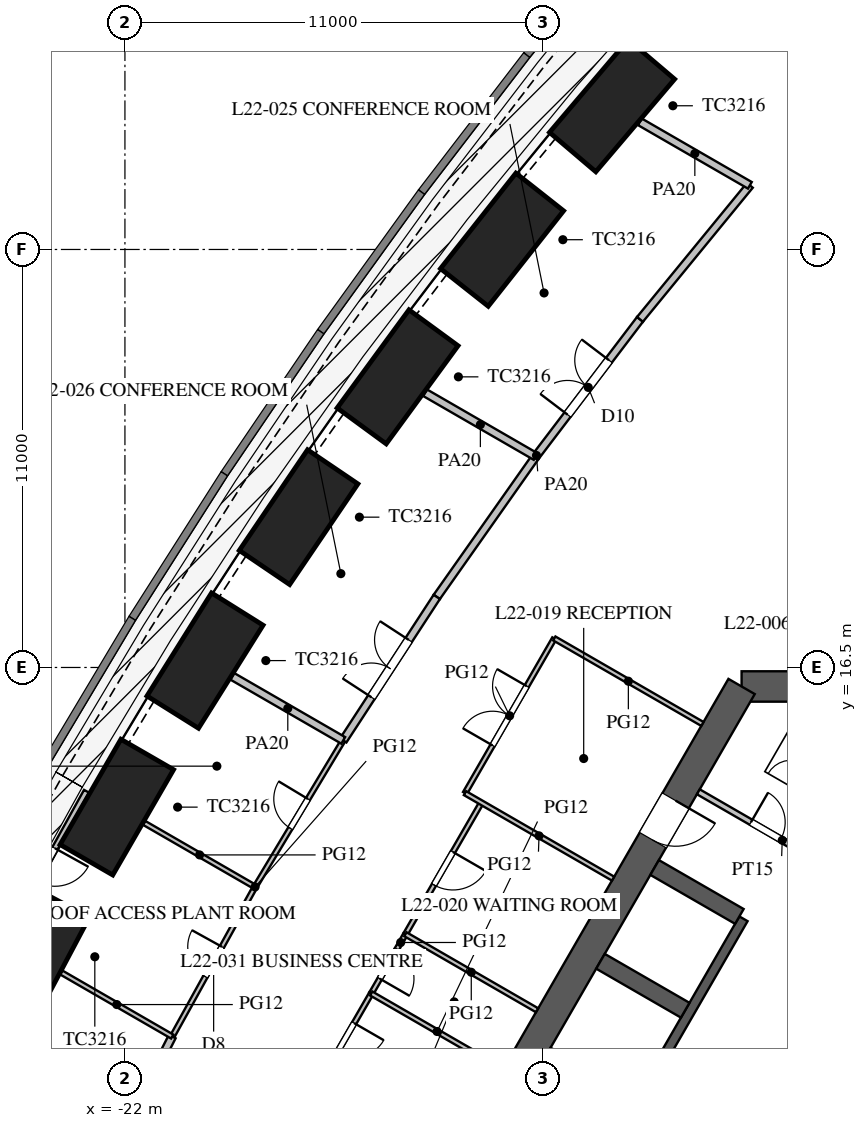
"""IFC4 building model, lengths in metres.
Left out: names, types, materials, properties, quantities, classifications, styles, units other than length and angle.
Written with IfcOpenShell. Run it as: python <this file> out.ifc"""

import sys

from ifc_helpers import new_model, si_unit, direction, frame, frame_2d, origin, origin_2d, place, context, subcontext, project, spatial, rectangle, extrude, element, fill, save


model = new_model("IFC4")
c1 = context("Model", 3, precision=1e-05, world=origin(), true_north=direction((0.0, 1.0)))
c2 = subcontext(c1, "Body", "Model", "MODEL_VIEW")
j1 = project(units=[si_unit("LENGTHUNIT", "METRE"), si_unit("PLANEANGLEUNIT", "RADIAN")], contexts=[c1])
p1 = place(None, origin())
s1 = spatial("IfcSite", under=j1, at=p1, CompositionType="ELEMENT")
p2 = place(p1, origin())
s2 = spatial("IfcBuilding", under=s1, at=p2, CompositionType="ELEMENT")
p3 = place(p2, frame((0.0, 0.0, 98.1)))
s3 = spatial("IfcBuildingStorey", under=s2, at=p3, CompositionType="ELEMENT", Elevation=98.1)
for number, where, z_axis, x_axis in (
    (1, (-9.182, 31.282, 0.0), (0.0, 0.0, 1.0), (-0.648, -0.762, 0.0)),
    (2, (-12.077, 27.757, 0.0), (0.0, 0.0, 1.0), (-0.62, -0.785, 0.0)),
    (3, (-14.825, 24.148, 0.0), (0.0, 0.0, 1.0), (-0.591, -0.807, 0.0)),
    (4, (-17.43, 20.456, 0.0), (0.0, 0.0, 1.0), (-0.561, -0.828, 0.0)),
    (5, (-19.893, 16.681, 0.0), (0.0, 0.0, 1.0), (-0.531, -0.847, 0.0)),
    (6, (-22.213, 12.825, 0.0), (0.0, 0.0, 1.0), (-0.5, -0.866, 0.0)),
    (7, (-24.393, 8.887, 0.0), (0.0, 0.0, 1.0), (-0.468, -0.883, 0.0)),
):
    element("IfcColumn", number, at=place(p3, frame(where, z_axis=z_axis, x_axis=x_axis)), inside=s3, PredefinedType="COLUMN", context=c2, shape_type="SweptSolid", body=[
        extrude(rectangle(XDim=3.2, YDim=1.6, at=origin_2d()), origin(), (0.0, 0.0, 1.0), 5.0),
    ])
p4 = place(p3, frame((5.773, 16.0, 0.0), z_axis=(0.0, 0.0, 1.0), x_axis=(-1.0, 0.0, 0.0)))
e8 = element("IfcWall", 8, at=p4, inside=s3, PredefinedType="SHEAR", context=c2, shape_type="SweptSolid", body=[
    extrude(rectangle(XDim=11.547, YDim=0.8, at=frame_2d((5.773, 0.0))), origin(), (0.0, 0.0, 1.0), 5.0),
])
p5 = place(p3, frame((-5.773, 16.0, 0.0), z_axis=(0.0, 0.0, 1.0), x_axis=(-0.500002442456, -0.866023993627, 0.0)))
e9 = element("IfcWall", 9, at=p5, inside=s3, PredefinedType="SHEAR", context=c2, shape_type="SweptSolid", body=[
    extrude(rectangle(XDim=21.939, YDim=0.8, at=frame_2d((10.97, 0.0))), origin(), (0.0, 0.0, 1.0), 5.0),
])
p6 = place(p5, frame((17.27, 0.0, 0.0)))
e10 = element("IfcOpeningElement", 10, at=p6, cuts=e9, PredefinedType="OPENING", context=c2, shape_type="SweptSolid", body=[
    extrude(rectangle(XDim=1.2, YDim=2.1, at=frame_2d((0.6, 1.05))), frame((0.0, 0.41, 0.0), z_axis=(0.0, -1.0, 0.0), x_axis=(1.0, 0.0, 0.0)), (0.0, 0.0, 1.0), 0.82),
])
p7 = place(p5, frame((3.47, 0.0, 0.0)))
e11 = element("IfcOpeningElement", 11, at=p7, cuts=e9, PredefinedType="OPENING", context=c2, shape_type="SweptSolid", body=[
    extrude(rectangle(XDim=1.2, YDim=2.1, at=frame_2d((0.6, 1.05))), frame((0.0, 0.41, 0.0), z_axis=(0.0, -1.0, 0.0), x_axis=(1.0, 0.0, 0.0)), (0.0, 0.0, 1.0), 0.82),
])
p8 = place(p3, frame((-5.724, 9.886, 0.0), z_axis=(0.0, 0.0, 1.0), x_axis=(-0.500001763848, -0.866024385424, 0.0)))
e12 = element("IfcWall", 12, at=p8, inside=s3, PredefinedType="SHEAR", context=c2, shape_type="SweptSolid", body=[
    extrude(rectangle(XDim=11.4, YDim=0.25, at=frame_2d((5.7, 0.0))), origin(), (0.0, 0.0, 1.0), 5.0),
])
p9 = place(p8, frame((6.525, 0.0, 0.0)))
e13 = element("IfcOpeningElement", 13, at=p9, cuts=e12, PredefinedType="OPENING", context=c2, shape_type="SweptSolid", body=[
    extrude(rectangle(XDim=1.2, YDim=2.2, at=frame_2d((0.6, 1.1))), frame((0.0, 0.135, 0.0), z_axis=(0.0, -1.0, 0.0), x_axis=(1.0, 0.0, 0.0)), (0.0, 0.0, 1.0), 0.27),
])
p10 = place(p8, frame((9.375, 0.0, 0.0)))
e14 = element("IfcOpeningElement", 14, at=p10, cuts=e12, PredefinedType="OPENING", context=c2, shape_type="SweptSolid", body=[
    extrude(rectangle(XDim=1.2, YDim=2.2, at=frame_2d((0.6, 1.1))), frame((0.0, 0.135, 0.0), z_axis=(0.0, -1.0, 0.0), x_axis=(1.0, 0.0, 0.0)), (0.0, 0.0, 1.0), 0.27),
])
p11 = place(p3, frame((-5.832, 9.949, 0.0), z_axis=(0.0, 0.0, 1.0), x_axis=(-0.866029291668, 0.499993265928, 0.0)))
e15 = element("IfcWall", 15, at=p11, inside=s3, PredefinedType="SHEAR", context=c2, shape_type="SweptSolid", body=[
    extrude(rectangle(XDim=2.575, YDim=0.45, at=frame_2d((1.288, 0.0))), origin(), (0.0, 0.0, 1.0), 5.0),
])
for number, where, z_axis, x_axis in (
    (16, (-7.257, 7.481, 0.0), (0.0, 0.0, 1.0), (-0.866, 0.5, 0.0)),
    (17, (-8.682, 5.012, 0.0), (0.0, 0.0, 1.0), (-0.866, 0.5, 0.0)),
):
    element("IfcWall", number, at=place(p3, frame(where, z_axis=z_axis, x_axis=x_axis)), inside=s3, PredefinedType="SHEAR", context=c2, shape_type="SweptSolid", body=[
        extrude(rectangle(XDim=2.575, YDim=0.45, at=frame_2d((1.288, 0.0))), origin(), (0.0, 0.0, 1.0), 5.0),
    ])
p12 = place(p3, frame((-8.372, 36.01, 0.0), z_axis=(0.0, 0.0, 1.0), x_axis=(-0.631833879056, -0.775103831288, 0.0)))
e18 = element("IfcWall", 18, at=p12, inside=s3, PredefinedType="PARAPET", context=c2, shape_type="SweptSolid", body=[
    extrude(rectangle(XDim=4.558, YDim=0.25, at=frame_2d((2.279, 0.0))), origin(), (0.0, 0.0, 1.0), 1.1),
])
p13 = place(p3, frame((-11.252, 32.477, 0.0), z_axis=(0.0, 0.0, 1.0), x_axis=(-0.608784932975, -0.79333530451, 0.0)))
e19 = element("IfcWall", 19, at=p13, inside=s3, PredefinedType="PARAPET", context=c2, shape_type="SweptSolid", body=[
    extrude(rectangle(XDim=4.539, YDim=0.25, at=frame_2d((2.27, 0.0))), origin(), (0.0, 0.0, 1.0), 1.1),
])
p14 = place(p3, frame((-14.015, 28.876, 0.0), z_axis=(0.0, 0.0, 1.0), x_axis=(-0.585376255171, -0.810761765183, 0.0)))
e20 = element("IfcWall", 20, at=p14, inside=s3, PredefinedType="PARAPET", context=c2, shape_type="SweptSolid", body=[
    extrude(rectangle(XDim=4.523, YDim=0.25, at=frame_2d((2.262, 0.0))), origin(), (0.0, 0.0, 1.0), 1.1),
])
p15 = place(p3, frame((-16.663, 25.209, 0.0), z_axis=(0.0, 0.0, 1.0), x_axis=(-0.561512004239, -0.827468591002, 0.0)))
e21 = element("IfcWall", 21, at=p15, inside=s3, PredefinedType="PARAPET", context=c2, shape_type="SweptSolid", body=[
    extrude(rectangle(XDim=4.512, YDim=0.25, at=frame_2d((2.256, 0.0))), origin(), (0.0, 0.0, 1.0), 1.1),
])
p16 = place(p3, frame((-19.197, 21.475, 0.0), z_axis=(0.0, 0.0, 1.0), x_axis=(-0.537205132487, -0.843451626135, 0.0)))
e22 = element("IfcWall", 22, at=p16, inside=s3, PredefinedType="PARAPET", context=c2, shape_type="SweptSolid", body=[
    extrude(rectangle(XDim=4.504, YDim=0.25, at=frame_2d((2.252, 0.0))), origin(), (0.0, 0.0, 1.0), 1.1),
])
p17 = place(p3, frame((-21.616, 17.676, 0.0), z_axis=(0.0, 0.0, 1.0), x_axis=(-0.51252396108, -0.858672923364, 0.0)))
e23 = element("IfcWall", 23, at=p17, inside=s3, PredefinedType="PARAPET", context=c2, shape_type="SweptSolid", body=[
    extrude(rectangle(XDim=4.5, YDim=0.25, at=frame_2d((2.25, 0.0))), origin(), (0.0, 0.0, 1.0), 1.1),
])
p18 = place(p3, frame((-23.923, 13.812, 0.0), z_axis=(0.0, 0.0, 1.0), x_axis=(-0.487373854787, -0.873193406795, 0.0)))
e24 = element("IfcWall", 24, at=p18, inside=s3, PredefinedType="PARAPET", context=c2, shape_type="SweptSolid", body=[
    extrude(rectangle(XDim=4.5, YDim=0.25, at=frame_2d((2.25, 0.0))), origin(), (0.0, 0.0, 1.0), 1.1),
])
p19 = place(p3, frame((-23.01, 13.243, 0.0), z_axis=(0.0, 0.0, 1.0), x_axis=(-0.48433245205, -0.874884035682, 0.0)))
e25 = element("IfcWall", 25, at=p19, inside=s3, PredefinedType="SOLIDWALL", context=c2, shape_type="SweptSolid", body=[
    extrude(rectangle(XDim=4.431, YDim=0.15, at=frame_2d((2.215, 0.0))), origin(), (0.0, 0.0, 1.0), 4.98),
])
p20 = place(p19, frame((1.715, 0.0, 0.0)))
e26 = element("IfcOpeningElement", 26, at=p20, cuts=e25, PredefinedType="OPENING", context=c2, shape_type="SweptSolid", body=[
    extrude(rectangle(XDim=1.0, YDim=2.1, at=frame_2d((0.5, 1.05))), frame((0.0, 0.085, 0.0), z_axis=(0.0, -1.0, 0.0), x_axis=(1.0, 0.0, 0.0)), (0.0, 0.0, 1.0), 0.17),
])
p21 = place(p3, frame((-2.495, 10.678, 0.0), z_axis=(0.0, 0.0, 1.0), x_axis=(-0.86602216432, 0.500005610874, 0.0)))
e27 = element("IfcWall", 27, at=p21, inside=s3, PredefinedType="PARTITIONING", context=c2, shape_type="SweptSolid", body=[
    extrude(rectangle(XDim=5.1, YDim=0.15, at=frame_2d((2.55, 0.0))), origin(), (0.0, 0.0, 1.0), 4.8),
])
p22 = place(p21, frame((2.6, 0.0, 0.0)))
e28 = element("IfcOpeningElement", 28, at=p22, cuts=e27, PredefinedType="OPENING", context=c2, shape_type="SweptSolid", body=[
    extrude(rectangle(XDim=0.9, YDim=2.1, at=frame_2d((0.45, 1.05))), frame((0.0, 0.085, 0.0), z_axis=(0.0, -1.0, 0.0), x_axis=(1.0, 0.0, 0.0)), (0.0, 0.0, 1.0), 0.17),
])
p23 = place(p3, frame((-15.519, 7.921, 0.0), z_axis=(0.0, 0.0, 1.0), x_axis=(-0.50000943426, -0.866019956843, 0.0)))
e29 = element("IfcWall", 29, at=p23, inside=s3, PredefinedType="PARTITIONING", context=c2, shape_type="SweptSolid", body=[
    extrude(rectangle(XDim=2.7, YDim=0.12, at=frame_2d((1.35, 0.0))), origin(), (0.0, 0.0, 1.0), 3.6),
])
p24 = place(p23, frame((0.9, 0.0, 0.0)))
e30 = element("IfcOpeningElement", 30, at=p24, cuts=e29, PredefinedType="OPENING", context=c2, shape_type="SweptSolid", body=[
    extrude(rectangle(XDim=0.9, YDim=2.1, at=frame_2d((0.45, 1.05))), frame((0.0, 0.07, 0.0), z_axis=(0.0, -1.0, 0.0), x_axis=(1.0, 0.0, 0.0)), (0.0, 0.0, 1.0), 0.14),
])
p25 = place(p3, frame((-14.619, 9.479, 0.0), z_axis=(0.0, 0.0, 1.0), x_axis=(-0.499961193289, -0.866047807691, 0.0)))
e31 = element("IfcWall", 31, at=p25, inside=s3, PredefinedType="PARTITIONING", context=c2, shape_type="SweptSolid", body=[
    extrude(rectangle(XDim=1.8, YDim=0.12, at=frame_2d((0.9, 0.0))), origin(), (0.0, 0.0, 1.0), 3.6),
])
p26 = place(p25, frame((0.45, 0.0, 0.0)))
e32 = element("IfcOpeningElement", 32, at=p26, cuts=e31, PredefinedType="OPENING", context=c2, shape_type="SweptSolid", body=[
    extrude(rectangle(XDim=0.9, YDim=2.1, at=frame_2d((0.45, 1.05))), frame((0.0, 0.07, 0.0), z_axis=(0.0, -1.0, 0.0), x_axis=(1.0, 0.0, 0.0)), (0.0, 0.0, 1.0), 0.14),
])
p27 = place(p3, frame((-12.619, 12.944, 0.0), z_axis=(0.0, 0.0, 1.0), x_axis=(-0.49999894854, -0.866026010844, 0.0)))
e33 = element("IfcWall", 33, at=p27, inside=s3, PredefinedType="PARTITIONING", context=c2, shape_type="SweptSolid", body=[
    extrude(rectangle(XDim=4.0, YDim=0.12, at=frame_2d((2.0, 0.0))), origin(), (0.0, 0.0, 1.0), 3.6),
])
p28 = place(p27, frame((1.5, 0.0, 0.0)))
e34 = element("IfcOpeningElement", 34, at=p28, cuts=e33, PredefinedType="OPENING", context=c2, shape_type="SweptSolid", body=[
    extrude(rectangle(XDim=1.0, YDim=2.1, at=frame_2d((0.5, 1.05))), frame((0.0, 0.07, 0.0), z_axis=(0.0, -1.0, 0.0), x_axis=(1.0, 0.0, 0.0)), (0.0, 0.0, 1.0), 0.14),
])
p29 = place(p3, frame((-10.702, 17.264, 0.0), z_axis=(0.0, 0.0, 1.0), x_axis=(-0.499977259774, -0.866038532462, 0.0)))
e35 = element("IfcWall", 35, at=p29, inside=s3, PredefinedType="PARTITIONING", context=c2, shape_type="SweptSolid", body=[
    extrude(rectangle(XDim=4.7, YDim=0.12, at=frame_2d((2.35, 0.0))), origin(), (0.0, 0.0, 1.0), 3.6),
])
p30 = place(p29, frame((1.45, 0.0, 0.0)))
e36 = element("IfcOpeningElement", 36, at=p30, cuts=e35, PredefinedType="OPENING", context=c2, shape_type="SweptSolid", body=[
    extrude(rectangle(XDim=1.8, YDim=2.1, at=frame_2d((0.9, 1.05))), frame((0.0, 0.07, 0.0), z_axis=(0.0, -1.0, 0.0), x_axis=(1.0, 0.0, 0.0)), (0.0, 0.0, 1.0), 0.14),
])
for number, where, z_axis, x_axis in (
    (37, (-12.055, 5.921, 0.0), (0.0, 0.0, 1.0), (-0.866, 0.5, 0.0)),
    (38, (-11.155, 7.479, 0.0), (0.0, 0.0, 1.0), (-0.866, 0.5, 0.0)),
):
    element("IfcWall", number, at=place(p3, frame(where, z_axis=z_axis, x_axis=x_axis)), inside=s3, PredefinedType="PARTITIONING", context=c2, shape_type="SweptSolid", body=[
        extrude(rectangle(XDim=4.0, YDim=0.12, at=frame_2d((2.0, 0.0))), origin(), (0.0, 0.0, 1.0), 3.6),
    ])
p31 = place(p3, frame((-9.155, 10.944, 0.0), z_axis=(0.0, 0.0, 1.0), x_axis=(-0.866017533419, 0.500013631625, 0.0)))
e39 = element("IfcWall", 39, at=p31, inside=s3, PredefinedType="PARTITIONING", context=c2, shape_type="SweptSolid", body=[
    extrude(rectangle(XDim=4.5, YDim=0.12, at=frame_2d((2.25, 0.0))), origin(), (0.0, 0.0, 1.0), 3.6),
])
p32 = place(p3, frame((-6.805, 15.014, 0.0), z_axis=(0.0, 0.0, 1.0), x_axis=(-0.866031096941, 0.499990139034, 0.0)))
e40 = element("IfcWall", 40, at=p32, inside=s3, PredefinedType="PARTITIONING", context=c2, shape_type="SweptSolid", body=[
    extrude(rectangle(XDim=4.5, YDim=0.12, at=frame_2d((2.25, 0.0))), origin(), (0.0, 0.0, 1.0), 3.6),
])
p33 = place(p3, frame((-18.576, 10.725, 0.0), z_axis=(0.0, 0.0, 1.0), x_axis=(-0.484292898211, -0.874905931368, 0.0)))
e41 = element("IfcWall", 41, at=p33, inside=s3, PredefinedType="PARTITIONING", context=c2, shape_type="SweptSolid", body=[
    extrude(rectangle(XDim=4.501, YDim=0.12, at=frame_2d((2.25, 0.0))), origin(), (0.0, 0.0, 1.0), 3.6),
])
p34 = place(p33, frame((1.8, 0.0, 0.0)))
e42 = element("IfcOpeningElement", 42, at=p34, cuts=e41, PredefinedType="OPENING", context=c2, shape_type="SweptSolid", body=[
    extrude(rectangle(XDim=0.9, YDim=2.1, at=frame_2d((0.45, 1.05))), frame((0.0, 0.07, 0.0), z_axis=(0.0, -1.0, 0.0), x_axis=(1.0, 0.0, 0.0)), (0.0, 0.0, 1.0), 0.14),
])
p35 = place(p3, frame((-20.756, 6.787, 0.0), z_axis=(0.0, 0.0, 1.0), x_axis=(-0.452471679136, -0.891778772779, 0.0)))
e43 = element("IfcWall", 43, at=p35, inside=s3, PredefinedType="PARTITIONING", context=c2, shape_type="SweptSolid", body=[
    extrude(rectangle(XDim=4.507, YDim=0.2, at=frame_2d((2.253, 0.0))), origin(), (0.0, 0.0, 1.0), 3.6),
])
p36 = place(p3, frame((-11.192, 22.05, 0.0), z_axis=(0.0, 0.0, 1.0), x_axis=(-0.575987178736, -0.817458726745, 0.0)))
e44 = element("IfcWall", 44, at=p36, inside=s3, PredefinedType="PARTITIONING", context=c2, shape_type="SweptSolid", body=[
    extrude(rectangle(XDim=4.518, YDim=0.2, at=frame_2d((2.259, 0.0))), origin(), (0.0, 0.0, 1.0), 3.6),
])
p37 = place(p3, frame((-8.447, 25.661, 0.0), z_axis=(0.0, 0.0, 1.0), x_axis=(-0.605274299339, -0.796016973789, 0.0)))
e45 = element("IfcWall", 45, at=p37, inside=s3, PredefinedType="PARTITIONING", context=c2, shape_type="SweptSolid", body=[
    extrude(rectangle(XDim=4.536, YDim=0.2, at=frame_2d((2.268, 0.0))), origin(), (0.0, 0.0, 1.0), 3.6),
])
p38 = place(p37, frame((1.35, 0.0, 0.0)))
e46 = element("IfcOpeningElement", 46, at=p38, cuts=e45, PredefinedType="OPENING", context=c2, shape_type="SweptSolid", body=[
    extrude(rectangle(XDim=1.8, YDim=2.1, at=frame_2d((0.9, 1.05))), frame((0.0, 0.11, 0.0), z_axis=(0.0, -1.0, 0.0), x_axis=(1.0, 0.0, 0.0)), (0.0, 0.0, 1.0), 0.22),
])
p39 = place(p3, frame((-5.556, 29.188, 0.0), z_axis=(0.0, 0.0, 1.0), x_axis=(-0.633843962561, -0.773460943503, 0.0)))
e47 = element("IfcWall", 47, at=p39, inside=s3, PredefinedType="PARTITIONING", context=c2, shape_type="SweptSolid", body=[
    extrude(rectangle(XDim=4.561, YDim=0.2, at=frame_2d((2.28, 0.0))), origin(), (0.0, 0.0, 1.0), 3.6),
])
p40 = place(p3, frame((-16.256, 14.581, 0.0), z_axis=(0.0, 0.0, 1.0), x_axis=(-0.515548366618, -0.856860479703, 0.0)))
e48 = element("IfcWall", 48, at=p40, inside=s3, PredefinedType="PARTITIONING", context=c2, shape_type="SweptSolid", body=[
    extrude(rectangle(XDim=4.501, YDim=0.12, at=frame_2d((2.25, 0.0))), origin(), (0.0, 0.0, 1.0), 3.6),
])
p41 = place(p40, frame((1.8, 0.0, 0.0)))
e49 = element("IfcOpeningElement", 49, at=p41, cuts=e48, PredefinedType="OPENING", context=c2, shape_type="SweptSolid", body=[
    extrude(rectangle(XDim=0.9, YDim=2.1, at=frame_2d((0.45, 1.05))), frame((0.0, 0.07, 0.0), z_axis=(0.0, -1.0, 0.0), x_axis=(1.0, 0.0, 0.0)), (0.0, 0.0, 1.0), 0.14),
])
p42 = place(p3, frame((-13.795, 18.357, 0.0), z_axis=(0.0, 0.0, 1.0), x_axis=(-0.546069464151, -0.837739900161, 0.0)))
e50 = element("IfcWall", 50, at=p42, inside=s3, PredefinedType="PARTITIONING", context=c2, shape_type="SweptSolid", body=[
    extrude(rectangle(XDim=4.507, YDim=0.2, at=frame_2d((2.253, 0.0))), origin(), (0.0, 0.0, 1.0), 3.6),
])
p43 = place(p42, frame((1.35, 0.0, 0.0)))
e51 = element("IfcOpeningElement", 51, at=p43, cuts=e50, PredefinedType="OPENING", context=c2, shape_type="SweptSolid", body=[
    extrude(rectangle(XDim=1.8, YDim=2.1, at=frame_2d((0.9, 1.05))), frame((0.0, 0.11, 0.0), z_axis=(0.0, -1.0, 0.0), x_axis=(1.0, 0.0, 0.0)), (0.0, 0.0, 1.0), 0.22),
])
p44 = place(p3, frame((-18.576, 10.725, 0.0), z_axis=(0.0, 0.0, 1.0), x_axis=(-0.866014270972, 0.500019282102, 0.0)))
e52 = element("IfcWall", 52, at=p44, inside=s3, PredefinedType="PARTITIONING", context=c2, shape_type="SweptSolid", body=[
    extrude(rectangle(XDim=3.37, YDim=0.12, at=frame_2d((1.685, 0.0))), origin(), (0.0, 0.0, 1.0), 3.2),
])
p45 = place(p3, frame((-20.756, 6.787, 0.0), z_axis=(0.0, 0.0, 1.0), x_axis=(-0.866022675988, 0.500004724652, 0.0)))
e53 = element("IfcWall", 53, at=p45, inside=s3, PredefinedType="PARTITIONING", context=c2, shape_type="SweptSolid", body=[
    extrude(rectangle(XDim=3.369, YDim=0.12, at=frame_2d((1.685, 0.0))), origin(), (0.0, 0.0, 1.0), 3.2),
])
p46 = place(p3, frame((-11.192, 22.05, 0.0), z_axis=(0.0, 0.0, 1.0), x_axis=(-0.866025882247, 0.499999171277, 0.0)))
e54 = element("IfcWall", 54, at=p46, inside=s3, PredefinedType="PARTITIONING", context=c2, shape_type="SweptSolid", body=[
    extrude(rectangle(XDim=3.36, YDim=0.2, at=frame_2d((1.68, 0.0))), origin(), (0.0, 0.0, 1.0), 3.0),
])
p47 = place(p3, frame((-5.556, 29.188, 0.0), z_axis=(0.0, 0.0, 1.0), x_axis=(-0.866018979599, 0.50001112685, 0.0)))
e55 = element("IfcWall", 55, at=p47, inside=s3, PredefinedType="PARTITIONING", context=c2, shape_type="SweptSolid", body=[
    extrude(rectangle(XDim=3.343, YDim=0.2, at=frame_2d((1.672, 0.0))), origin(), (0.0, 0.0, 1.0), 3.4),
])
p48 = place(p3, frame((-16.256, 14.581, 0.0), z_axis=(0.0, 0.0, 1.0), x_axis=(-0.866022675988, 0.500004724652, 0.0)))
e56 = element("IfcWall", 56, at=p48, inside=s3, PredefinedType="PARTITIONING", context=c2, shape_type="SweptSolid", body=[
    extrude(rectangle(XDim=3.369, YDim=0.2, at=frame_2d((1.685, 0.0))), origin(), (0.0, 0.0, 1.0), 3.2),
])
p49 = place(p20, origin())
e57 = element("IfcDoor", 57, at=p49, inside=s3, OperationType="SINGLE_SWING_LEFT", PredefinedType="DOOR", context=c2, shape_type="SweptSolid", body=[
    extrude(rectangle(XDim=1.0, YDim=2.1, at=frame_2d((0.5, 1.05))), frame((0.0, 0.025, 0.0), z_axis=(0.0, -1.0, 0.0), x_axis=(1.0, 0.0, 0.0)), (0.0, 0.0, 1.0), 0.05),
])
fill(e26, e57)
p50 = place(p22, frame((0.9, 0.0, 0.0), z_axis=(0.0, 0.0, 1.0), x_axis=(-1.0, 0.0, 0.0)))
e58 = element("IfcDoor", 58, at=p50, inside=s3, OperationType="SINGLE_SWING_LEFT", PredefinedType="DOOR", context=c2, shape_type="SweptSolid", body=[
    extrude(rectangle(XDim=0.9, YDim=2.1, at=frame_2d((0.45, 1.05))), frame((0.0, 0.025, 0.0), z_axis=(0.0, -1.0, 0.0), x_axis=(1.0, 0.0, 0.0)), (0.0, 0.0, 1.0), 0.05),
])
fill(e28, e58)
p51 = place(p7, origin())
e59 = element("IfcDoor", 59, at=p51, inside=s3, OperationType="SINGLE_SWING_LEFT", PredefinedType="DOOR", context=c2, shape_type="SweptSolid", body=[
    extrude(rectangle(XDim=1.2, YDim=2.1, at=frame_2d((0.6, 1.05))), frame((0.0, 0.025, 0.0), z_axis=(0.0, -1.0, 0.0), x_axis=(1.0, 0.0, 0.0)), (0.0, 0.0, 1.0), 0.05),
])
fill(e11, e59)
p52 = place(p30, frame((1.8, 0.0, 0.0), z_axis=(0.0, 0.0, 1.0), x_axis=(-1.0, 0.0, 0.0)))
e60 = element("IfcDoor", 60, at=p52, inside=s3, OperationType="DOUBLE_DOOR_SINGLE_SWING", PredefinedType="DOOR", context=c2, shape_type="SweptSolid", body=[
    extrude(rectangle(XDim=1.8, YDim=2.1, at=frame_2d((0.9, 1.05))), frame((0.0, 0.025, 0.0), z_axis=(0.0, -1.0, 0.0), x_axis=(1.0, 0.0, 0.0)), (0.0, 0.0, 1.0), 0.05),
])
fill(e36, e60)
p53 = place(p28, origin())
e61 = element("IfcDoor", 61, at=p53, inside=s3, OperationType="SINGLE_SWING_LEFT", PredefinedType="DOOR", context=c2, shape_type="SweptSolid", body=[
    extrude(rectangle(XDim=1.0, YDim=2.1, at=frame_2d((0.5, 1.05))), frame((0.0, 0.025, 0.0), z_axis=(0.0, -1.0, 0.0), x_axis=(1.0, 0.0, 0.0)), (0.0, 0.0, 1.0), 0.05),
])
fill(e34, e61)
p54 = place(p26, origin())
e62 = element("IfcDoor", 62, at=p54, inside=s3, OperationType="SINGLE_SWING_RIGHT", PredefinedType="DOOR", context=c2, shape_type="SweptSolid", body=[
    extrude(rectangle(XDim=0.9, YDim=2.1, at=frame_2d((0.45, 1.05))), frame((0.0, 0.025, 0.0), z_axis=(0.0, -1.0, 0.0), x_axis=(1.0, 0.0, 0.0)), (0.0, 0.0, 1.0), 0.05),
])
fill(e32, e62)
p55 = place(p24, origin())
e63 = element("IfcDoor", 63, at=p55, inside=s3, OperationType="SINGLE_SWING_LEFT", PredefinedType="DOOR", context=c2, shape_type="SweptSolid", body=[
    extrude(rectangle(XDim=0.9, YDim=2.1, at=frame_2d((0.45, 1.05))), frame((0.0, 0.025, 0.0), z_axis=(0.0, -1.0, 0.0), x_axis=(1.0, 0.0, 0.0)), (0.0, 0.0, 1.0), 0.05),
])
fill(e30, e63)
p56 = place(p34, frame((0.9, 0.0, 0.0), z_axis=(0.0, 0.0, 1.0), x_axis=(-1.0, 0.0, 0.0)))
e64 = element("IfcDoor", 64, at=p56, inside=s3, OperationType="SINGLE_SWING_RIGHT", PredefinedType="DOOR", context=c2, shape_type="SweptSolid", body=[
    extrude(rectangle(XDim=0.9, YDim=2.1, at=frame_2d((0.45, 1.05))), frame((0.0, 0.025, 0.0), z_axis=(0.0, -1.0, 0.0), x_axis=(1.0, 0.0, 0.0)), (0.0, 0.0, 1.0), 0.05),
])
fill(e42, e64)
p57 = place(p38, frame((1.8, 0.0, 0.0), z_axis=(0.0, 0.0, 1.0), x_axis=(-1.0, 0.0, 0.0)))
e65 = element("IfcDoor", 65, at=p57, inside=s3, OperationType="DOUBLE_DOOR_SINGLE_SWING", PredefinedType="DOOR", context=c2, shape_type="SweptSolid", body=[
    extrude(rectangle(XDim=1.8, YDim=2.1, at=frame_2d((0.9, 1.05))), frame((0.0, 0.025, 0.0), z_axis=(0.0, -1.0, 0.0), x_axis=(1.0, 0.0, 0.0)), (0.0, 0.0, 1.0), 0.05),
])
fill(e46, e65)
p58 = place(p43, frame((1.8, 0.0, 0.0), z_axis=(0.0, 0.0, 1.0), x_axis=(-1.0, 0.0, 0.0)))
e66 = element("IfcDoor", 66, at=p58, inside=s3, OperationType="DOUBLE_DOOR_SINGLE_SWING", PredefinedType="DOOR", context=c2, shape_type="SweptSolid", body=[
    extrude(rectangle(XDim=1.8, YDim=2.1, at=frame_2d((0.9, 1.05))), frame((0.0, 0.025, 0.0), z_axis=(0.0, -1.0, 0.0), x_axis=(1.0, 0.0, 0.0)), (0.0, 0.0, 1.0), 0.05),
])
fill(e51, e66)
p59 = place(p41, frame((0.9, 0.0, 0.0), z_axis=(0.0, 0.0, 1.0), x_axis=(-1.0, 0.0, 0.0)))
e67 = element("IfcDoor", 67, at=p59, inside=s3, OperationType="SINGLE_SWING_RIGHT", PredefinedType="DOOR", context=c2, shape_type="SweptSolid", body=[
    extrude(rectangle(XDim=0.9, YDim=2.1, at=frame_2d((0.45, 1.05))), frame((0.0, 0.025, 0.0), z_axis=(0.0, -1.0, 0.0), x_axis=(1.0, 0.0, 0.0)), (0.0, 0.0, 1.0), 0.05),
])
fill(e49, e67)
save(model, sys.argv[1])
